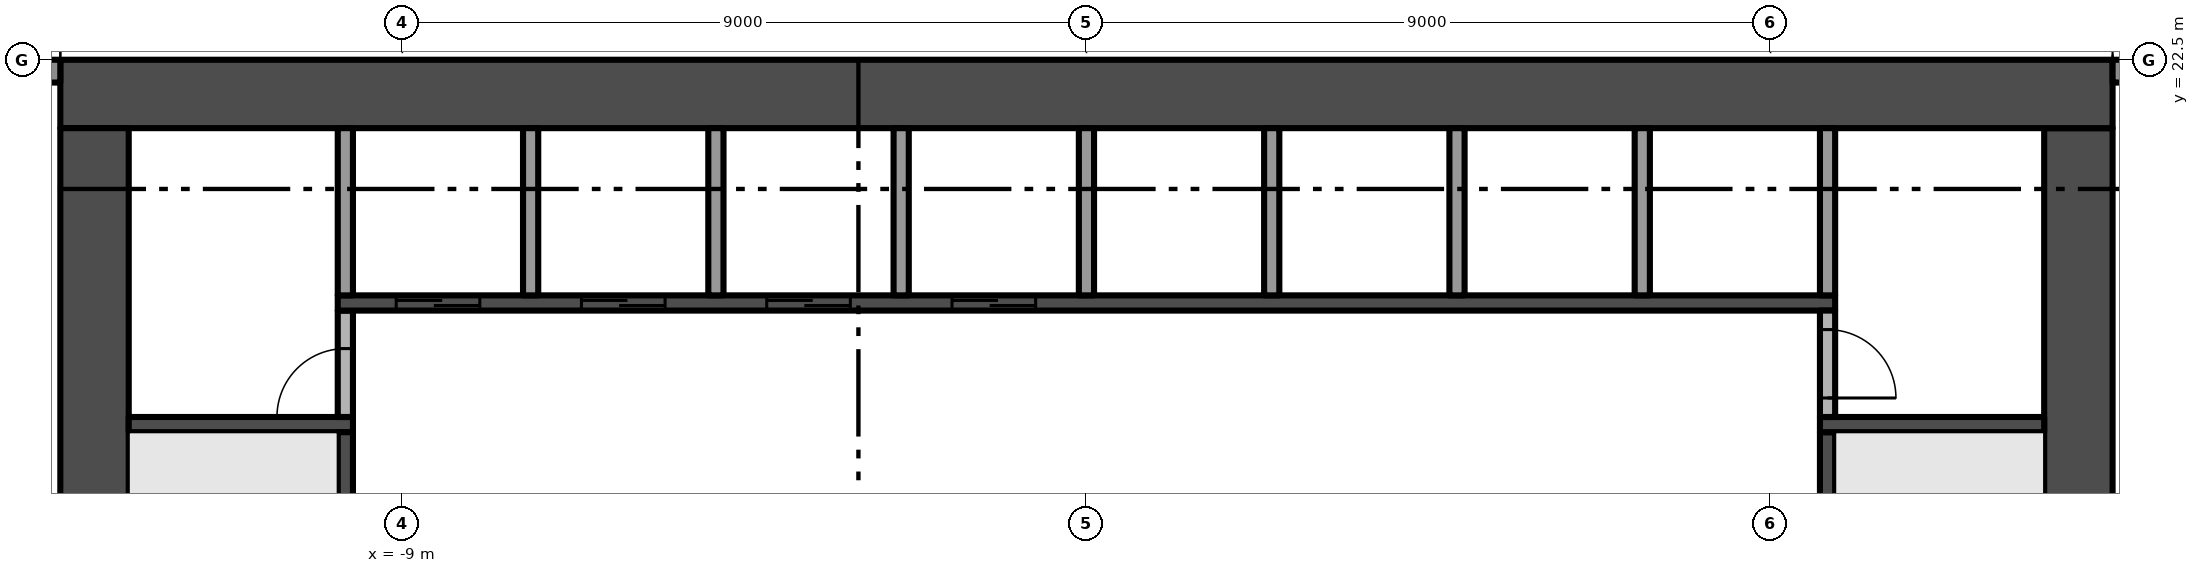
"""IFC4 building model, lengths in metres.
Left out: names, types, materials, properties, quantities, classifications, styles, units other than length and angle.
Written with IfcOpenShell. Run it as: python <this file> out.ifc"""

import sys

from ifc_helpers import new_model, si_unit, direction, frame, frame_2d, origin, place, context, subcontext, project, spatial, rectangle, extrude, element, fill, save


model = new_model("IFC4")
c1 = context("Model", 3, precision=1e-05, world=origin(), true_north=direction((0.0, 1.0)))
c2 = subcontext(c1, "Body", "Model", "MODEL_VIEW")
j1 = project(units=[si_unit("LENGTHUNIT", "METRE"), si_unit("PLANEANGLEUNIT", "RADIAN")], contexts=[c1])
p1 = place(None, origin())
s1 = spatial("IfcSite", under=j1, at=p1, CompositionType="ELEMENT")
p2 = place(p1, origin())
s2 = spatial("IfcBuilding", under=s1, at=p2, CompositionType="ELEMENT")
p3 = place(p2, frame((0.0, 0.0, 84.6)))
s3 = spatial("IfcBuildingStorey", under=s2, at=p3, CompositionType="ELEMENT", Elevation=84.6)
p4 = place(p3, frame((13.05, 5.4, -0.3), z_axis=(0.0, 0.0, 1.0), x_axis=(0.0, 1.0, 0.0)))
e1 = element("IfcWall", 1, at=p4, inside=s3, PredefinedType="SHEAR", context=c2, shape_type="SweptSolid", body=[
    extrude(rectangle(XDim=16.2, YDim=0.9, at=frame_2d((8.1, 0.0))), origin(), (0.0, 0.0, 1.0), 3.8),
])
p5 = place(p4, frame((6.0, 0.0, 0.3)))
e2 = element("IfcOpeningElement", 2, at=p5, cuts=e1, PredefinedType="OPENING", context=c2, shape_type="SweptSolid", body=[
    extrude(rectangle(XDim=1.2, YDim=2.2, at=frame_2d((0.6, 1.1))), frame((0.0, 0.46, 0.0), z_axis=(0.0, -1.0, 0.0), x_axis=(1.0, 0.0, 0.0)), (0.0, 0.0, 1.0), 0.92),
])
p6 = place(p3, frame((13.5, 22.05, -0.3), z_axis=(0.0, 0.0, 1.0), x_axis=(-1.0, 0.0, 0.0)))
e3 = element("IfcWall", 3, at=p6, inside=s3, PredefinedType="SHEAR", context=c2, shape_type="SweptSolid", body=[
    extrude(rectangle(XDim=27.0, YDim=0.9, at=frame_2d((13.5, 0.0))), origin(), (0.0, 0.0, 1.0), 3.8),
])
p7 = place(p3, frame((-13.05, 21.6, -0.3), z_axis=(0.0, 0.0, 1.0), x_axis=(0.0, -1.0, 0.0)))
e4 = element("IfcWall", 4, at=p7, inside=s3, PredefinedType="SHEAR", context=c2, shape_type="SweptSolid", body=[
    extrude(rectangle(XDim=16.2, YDim=0.9, at=frame_2d((8.1, 0.0))), origin(), (0.0, 0.0, 1.0), 3.8),
])
p8 = place(p7, frame((9.0, 0.0, 0.3)))
e5 = element("IfcOpeningElement", 5, at=p8, cuts=e4, PredefinedType="OPENING", context=c2, shape_type="SweptSolid", body=[
    extrude(rectangle(XDim=1.2, YDim=2.2, at=frame_2d((0.6, 1.1))), frame((0.0, 0.46, 0.0), z_axis=(0.0, -1.0, 0.0), x_axis=(1.0, 0.0, 0.0)), (0.0, 0.0, 1.0), 0.92),
])
p9 = place(p3, frame((13.5, 22.35, 0.0), z_axis=(0.0, 0.0, 1.0), x_axis=(1.0, 0.0, 0.0)))
e6 = element("IfcWall", 6, at=p9, inside=s3, PredefinedType="SOLIDWALL", context=c2, shape_type="SweptSolid", body=[
    extrude(rectangle(XDim=3.85, YDim=0.3, at=frame_2d((1.925, 0.0))), origin(), (0.0, 0.0, 1.0), 3.5),
])
p10 = place(p9, frame((0.775, 0.0, 0.45)))
e7 = element("IfcOpeningElement", 7, at=p10, cuts=e6, PredefinedType="OPENING", context=c2, shape_type="SweptSolid", body=[
    extrude(rectangle(XDim=2.775, YDim=2.65, at=frame_2d((1.387, 1.325))), frame((0.0, 0.16, 0.0), z_axis=(0.0, -1.0, 0.0), x_axis=(1.0, 0.0, 0.0)), (0.0, 0.0, 1.0), 0.32),
])
p11 = place(p3, frame((-17.35, 22.35, 0.0), z_axis=(0.0, 0.0, 1.0), x_axis=(1.0, 0.0, 0.0)))
e8 = element("IfcWall", 8, at=p11, inside=s3, PredefinedType="SOLIDWALL", context=c2, shape_type="SweptSolid", body=[
    extrude(rectangle(XDim=3.85, YDim=0.3, at=frame_2d((1.925, 0.0))), origin(), (0.0, 0.0, 1.0), 3.5),
])
p12 = place(p11, frame((0.3, 0.0, 0.0)))
e9 = element("IfcOpeningElement", 9, at=p12, cuts=e8, PredefinedType="OPENING", context=c2, shape_type="SweptSolid", body=[
    extrude(rectangle(XDim=2.775, YDim=2.4, at=frame_2d((1.387, 1.2))), frame((0.0, 0.16, 0.0), z_axis=(0.0, -1.0, 0.0), x_axis=(1.0, 0.0, 0.0)), (0.0, 0.0, 1.0), 0.32),
])
p13 = place(p3, frame((-12.6, 17.7, 0.0), z_axis=(0.0, 0.0, 1.0), x_axis=(1.0, 0.0, 0.0)))
e10 = element("IfcWall", 10, at=p13, inside=s3, PredefinedType="SHEAR", context=c2, shape_type="SweptSolid", body=[
    extrude(rectangle(XDim=2.95, YDim=0.2, at=frame_2d((1.475, 0.0))), origin(), (0.0, 0.0, 1.0), 3.5),
])
p14 = place(p3, frame((-9.75, 16.1, 0.0), z_axis=(0.0, 0.0, 1.0), x_axis=(0.0, 1.0, 0.0)))
e11 = element("IfcWall", 11, at=p14, inside=s3, PredefinedType="SHEAR", context=c2, shape_type="SweptSolid", body=[
    extrude(rectangle(XDim=1.5, YDim=0.2, at=frame_2d((0.75, 0.0))), origin(), (0.0, 0.0, 1.0), 3.5),
])
p15 = place(p3, frame((-9.75, 17.8, 0.0), z_axis=(0.0, 0.0, 1.0), x_axis=(0.0, 1.0, 0.0)))
e12 = element("IfcWall", 12, at=p15, inside=s3, PredefinedType="PARTITIONING", context=c2, shape_type="SweptSolid", body=[
    extrude(rectangle(XDim=1.4, YDim=0.2, at=frame_2d((0.7, 0.0))), origin(), (0.0, 0.0, 1.0), 3.5),
])
p16 = place(p15, origin())
e13 = element("IfcOpeningElement", 13, at=p16, cuts=e12, PredefinedType="OPENING", context=c2, shape_type="SweptSolid", body=[
    extrude(rectangle(XDim=0.9, YDim=2.1, at=frame_2d((0.45, 1.05))), frame((0.0, 0.11, 0.0), z_axis=(0.0, -1.0, 0.0), x_axis=(1.0, 0.0, 0.0)), (0.0, 0.0, 1.0), 0.22),
])
p17 = place(p3, frame((-9.85, 19.3, 0.0), z_axis=(0.0, 0.0, 1.0), x_axis=(1.0, 0.0, 0.0)))
e14 = element("IfcWall", 14, at=p17, inside=s3, PredefinedType="SHEAR", context=c2, shape_type="SweptSolid", body=[
    extrude(rectangle(XDim=19.7, YDim=0.2, at=frame_2d((9.85, 0.0))), origin(), (0.0, 0.0, 1.0), 3.5),
])
p18 = place(p17, frame((0.769, 0.0, 0.0)))
e15 = element("IfcOpeningElement", 15, at=p18, cuts=e14, PredefinedType="OPENING", context=c2, shape_type="SweptSolid", body=[
    extrude(rectangle(XDim=1.1, YDim=2.1, at=frame_2d((0.55, 1.05))), frame((0.0, 0.11, 0.0), z_axis=(0.0, -1.0, 0.0), x_axis=(1.0, 0.0, 0.0)), (0.0, 0.0, 1.0), 0.22),
])
p19 = place(p17, frame((3.206, 0.0, 0.0)))
e16 = element("IfcOpeningElement", 16, at=p19, cuts=e14, PredefinedType="OPENING", context=c2, shape_type="SweptSolid", body=[
    extrude(rectangle(XDim=1.1, YDim=2.1, at=frame_2d((0.55, 1.05))), frame((0.0, 0.11, 0.0), z_axis=(0.0, -1.0, 0.0), x_axis=(1.0, 0.0, 0.0)), (0.0, 0.0, 1.0), 0.22),
])
p20 = place(p17, frame((5.644, 0.0, 0.0)))
e17 = element("IfcOpeningElement", 17, at=p20, cuts=e14, PredefinedType="OPENING", context=c2, shape_type="SweptSolid", body=[
    extrude(rectangle(XDim=1.1, YDim=2.1, at=frame_2d((0.55, 1.05))), frame((0.0, 0.11, 0.0), z_axis=(0.0, -1.0, 0.0), x_axis=(1.0, 0.0, 0.0)), (0.0, 0.0, 1.0), 0.22),
])
p21 = place(p17, frame((8.081, 0.0, 0.0)))
e18 = element("IfcOpeningElement", 18, at=p21, cuts=e14, PredefinedType="OPENING", context=c2, shape_type="SweptSolid", body=[
    extrude(rectangle(XDim=1.1, YDim=2.1, at=frame_2d((0.55, 1.05))), frame((0.0, 0.11, 0.0), z_axis=(0.0, -1.0, 0.0), x_axis=(1.0, 0.0, 0.0)), (0.0, 0.0, 1.0), 0.22),
])
for number, where, z_axis, x_axis in (
    (19, (-9.75, 19.4, 0.0), (0.0, 0.0, 1.0), (0.0, 1.0, 0.0)),
    (20, (-7.312, 19.4, 0.0), (0.0, 0.0, 1.0), (0.0, 1.0, 0.0)),
    (21, (-4.875, 19.4, 0.0), (0.0, 0.0, 1.0), (0.0, 1.0, 0.0)),
    (22, (-2.438, 19.4, 0.0), (0.0, 0.0, 1.0), (0.0, 1.0, 0.0)),
    (23, (0.0, 19.4, 0.0), (0.0, 0.0, 1.0), (0.0, 1.0, 0.0)),
    (24, (2.438, 19.4, 0.0), (0.0, 0.0, 1.0), (0.0, 1.0, 0.0)),
    (25, (4.875, 19.4, 0.0), (0.0, 0.0, 1.0), (0.0, 1.0, 0.0)),
    (26, (7.312, 19.4, 0.0), (0.0, 0.0, 1.0), (0.0, 1.0, 0.0)),
):
    element("IfcWall", number, at=place(p3, frame(where, z_axis=z_axis, x_axis=x_axis)), inside=s3, PredefinedType="PARTITIONING", context=c2, shape_type="SweptSolid", body=[
        extrude(rectangle(XDim=2.2, YDim=0.2, at=frame_2d((1.1, 0.0))), origin(), (0.0, 0.0, 1.0), 3.5),
    ])
p22 = place(p3, frame((9.75, 16.1, 0.0), z_axis=(0.0, 0.0, 1.0), x_axis=(0.0, 1.0, 0.0)))
e27 = element("IfcWall", 27, at=p22, inside=s3, PredefinedType="SHEAR", context=c2, shape_type="SweptSolid", body=[
    extrude(rectangle(XDim=1.5, YDim=0.2, at=frame_2d((0.75, 0.0))), origin(), (0.0, 0.0, 1.0), 3.5),
])
p23 = place(p3, frame((9.65, 17.7, 0.0), z_axis=(0.0, 0.0, 1.0), x_axis=(1.0, 0.0, 0.0)))
e28 = element("IfcWall", 28, at=p23, inside=s3, PredefinedType="SHEAR", context=c2, shape_type="SweptSolid", body=[
    extrude(rectangle(XDim=2.95, YDim=0.2, at=frame_2d((1.475, 0.0))), origin(), (0.0, 0.0, 1.0), 3.5),
])
p24 = place(p3, frame((9.75, 19.2, 0.0), z_axis=(0.0, 0.0, 1.0), x_axis=(0.0, -1.0, 0.0)))
e29 = element("IfcWall", 29, at=p24, inside=s3, PredefinedType="PARTITIONING", context=c2, shape_type="SweptSolid", body=[
    extrude(rectangle(XDim=1.4, YDim=0.2, at=frame_2d((0.7, 0.0))), origin(), (0.0, 0.0, 1.0), 3.5),
])
p25 = place(p24, frame((0.25, 0.0, 0.0)))
e30 = element("IfcOpeningElement", 30, at=p25, cuts=e29, PredefinedType="OPENING", context=c2, shape_type="SweptSolid", body=[
    extrude(rectangle(XDim=0.9, YDim=2.1, at=frame_2d((0.45, 1.05))), frame((0.0, 0.11, 0.0), z_axis=(0.0, -1.0, 0.0), x_axis=(1.0, 0.0, 0.0)), (0.0, 0.0, 1.0), 0.22),
])
p26 = place(p3, frame((9.75, 19.4, 0.0), z_axis=(0.0, 0.0, 1.0), x_axis=(0.0, 1.0, 0.0)))
e31 = element("IfcWall", 31, at=p26, inside=s3, PredefinedType="PARTITIONING", context=c2, shape_type="SweptSolid", body=[
    extrude(rectangle(XDim=2.2, YDim=0.2, at=frame_2d((1.1, 0.0))), origin(), (0.0, 0.0, 1.0), 3.5),
])
p27 = place(p18, origin())
e32 = element("IfcDoor", 32, at=p27, inside=s3, OperationType="SLIDING_TO_LEFT", PredefinedType="DOOR", context=c2, shape_type="SweptSolid", body=[
    extrude(rectangle(XDim=1.1, YDim=2.1, at=frame_2d((0.55, 1.05))), frame((0.0, 0.025, 0.0), z_axis=(0.0, -1.0, 0.0), x_axis=(1.0, 0.0, 0.0)), (0.0, 0.0, 1.0), 0.05),
])
fill(e15, e32)
p28 = place(p19, origin())
e33 = element("IfcDoor", 33, at=p28, inside=s3, OperationType="SLIDING_TO_LEFT", PredefinedType="DOOR", context=c2, shape_type="SweptSolid", body=[
    extrude(rectangle(XDim=1.1, YDim=2.1, at=frame_2d((0.55, 1.05))), frame((0.0, 0.025, 0.0), z_axis=(0.0, -1.0, 0.0), x_axis=(1.0, 0.0, 0.0)), (0.0, 0.0, 1.0), 0.05),
])
fill(e16, e33)
p29 = place(p20, origin())
e34 = element("IfcDoor", 34, at=p29, inside=s3, OperationType="SLIDING_TO_LEFT", PredefinedType="DOOR", context=c2, shape_type="SweptSolid", body=[
    extrude(rectangle(XDim=1.1, YDim=2.1, at=frame_2d((0.55, 1.05))), frame((0.0, 0.025, 0.0), z_axis=(0.0, -1.0, 0.0), x_axis=(1.0, 0.0, 0.0)), (0.0, 0.0, 1.0), 0.05),
])
fill(e17, e34)
p30 = place(p21, origin())
e35 = element("IfcDoor", 35, at=p30, inside=s3, OperationType="SLIDING_TO_LEFT", PredefinedType="DOOR", context=c2, shape_type="SweptSolid", body=[
    extrude(rectangle(XDim=1.1, YDim=2.1, at=frame_2d((0.55, 1.05))), frame((0.0, 0.025, 0.0), z_axis=(0.0, -1.0, 0.0), x_axis=(1.0, 0.0, 0.0)), (0.0, 0.0, 1.0), 0.05),
])
fill(e18, e35)
p31 = place(p16, origin())
e36 = element("IfcDoor", 36, at=p31, inside=s3, OperationType="SINGLE_SWING_LEFT", PredefinedType="DOOR", context=c2, shape_type="SweptSolid", body=[
    extrude(rectangle(XDim=0.9, YDim=2.1, at=frame_2d((0.45, 1.05))), frame((0.0, 0.025, 0.0), z_axis=(0.0, -1.0, 0.0), x_axis=(1.0, 0.0, 0.0)), (0.0, 0.0, 1.0), 0.05),
])
fill(e13, e36)
p32 = place(p25, origin())
e37 = element("IfcDoor", 37, at=p32, inside=s3, OperationType="SINGLE_SWING_RIGHT", PredefinedType="DOOR", context=c2, shape_type="SweptSolid", body=[
    extrude(rectangle(XDim=0.9, YDim=2.1, at=frame_2d((0.45, 1.05))), frame((0.0, 0.025, 0.0), z_axis=(0.0, -1.0, 0.0), x_axis=(1.0, 0.0, 0.0)), (0.0, 0.0, 1.0), 0.05),
])
fill(e30, e37)
save(model, sys.argv[1])
